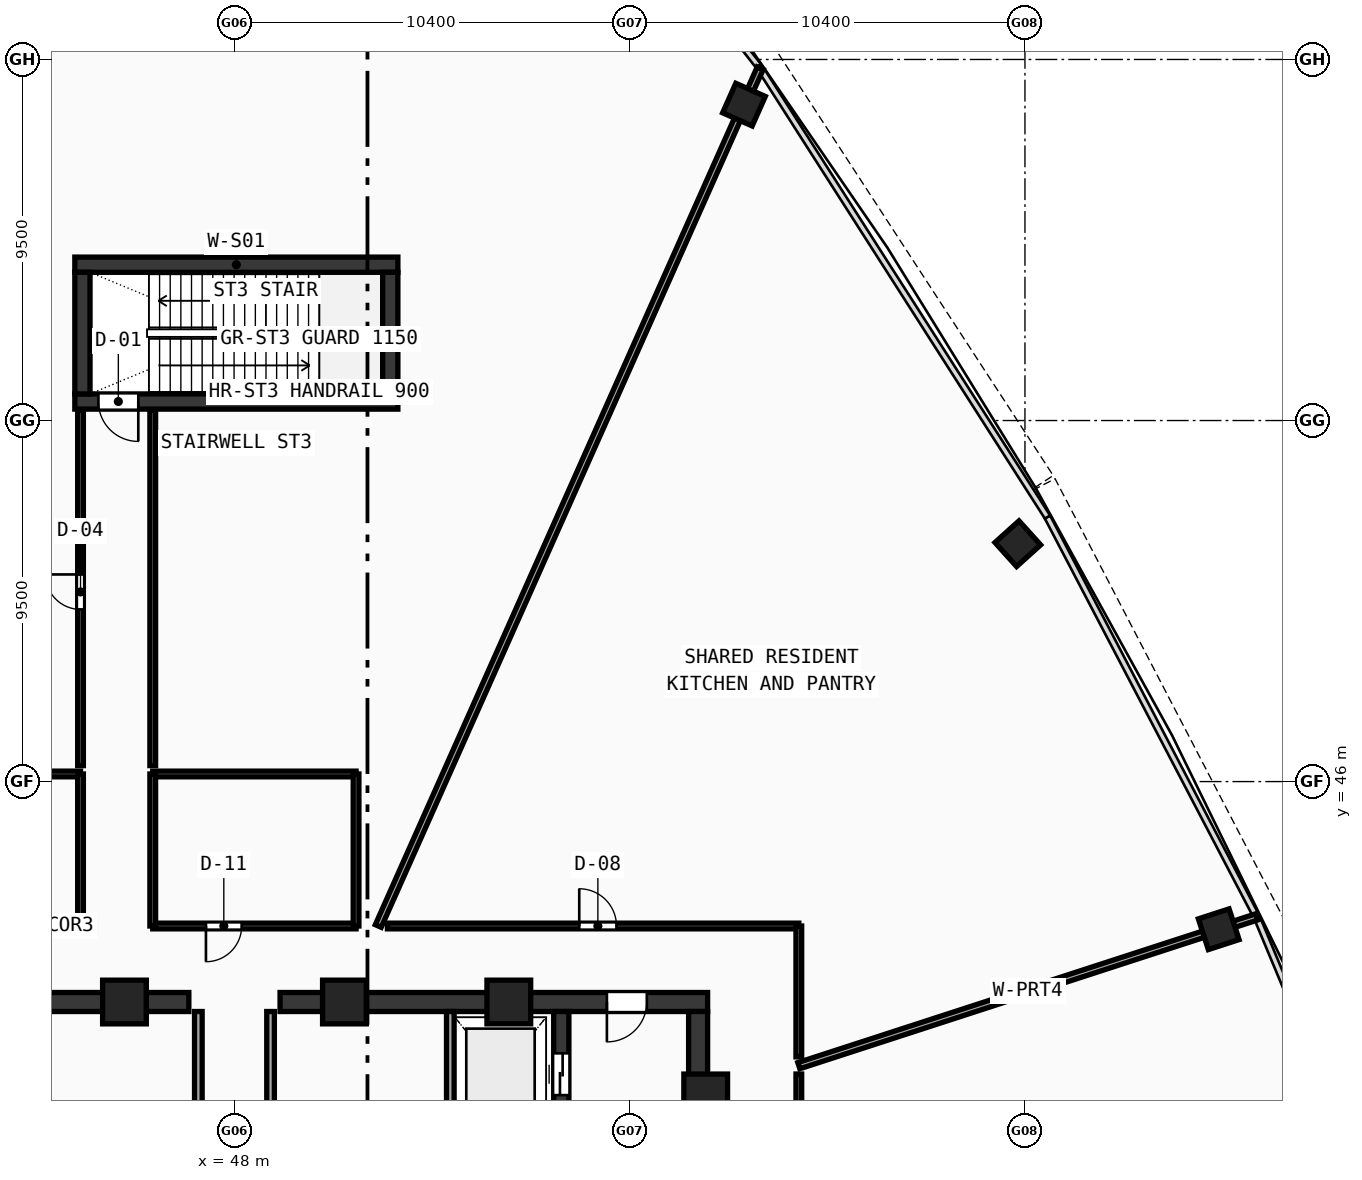
"""IFC4 building model, lengths in metres.
Left out: names, types, materials, properties, quantities, classifications, styles, units other than length and angle.
Written with IfcOpenShell. Run it as: python <this file> out.ifc"""

import sys

from ifc_helpers import new_model, si_unit, direction, frame, frame_2d, origin, origin_with_axes, origin_2d, place, context, subcontext, project, spatial, rectangle, hollow_rectangle, extrude, source, transform, mapped, element, fill, save


model = new_model("IFC4")
c1 = context("Model", 3, precision=1e-05, world=origin(), true_north=direction((0.0, 1.0)))
c2 = subcontext(c1, "Body", "Model", "MODEL_VIEW")
j1 = project(units=[si_unit("LENGTHUNIT", "METRE"), si_unit("PLANEANGLEUNIT", "RADIAN")], contexts=[c1])
p1 = place(None, origin())
s1 = spatial("IfcSite", under=j1, at=p1, CompositionType="ELEMENT")
p2 = place(p1, origin())
s2 = spatial("IfcBuilding", under=s1, at=p2, CompositionType="ELEMENT")
p3 = place(p2, frame((0.0, 0.0, 266.91)))
s3 = spatial("IfcBuildingStorey", under=s2, at=p3, CompositionType="ELEMENT", Elevation=266.91)
p4 = place(p3, frame((35.55, 40.2, 0.0), z_axis=(0.0, 0.0, 1.0), x_axis=(1.0, 0.0, 0.0)))
e1 = element("IfcWall", 1, at=p4, inside=s3, PredefinedType="SHEAR", context=c2, shape_type="SweptSolid", body=[
    extrude(rectangle(XDim=11.25, YDim=0.5, at=frame_2d((5.625, 0.0))), origin(), (0.0, 0.0, 1.0), 5.57),
])
p5 = place(p4, frame((1.6, 0.0, 0.0)))
e2 = element("IfcOpeningElement", 2, at=p5, cuts=e1, PredefinedType="OPENING", context=c2, shape_type="SweptSolid", body=[
    extrude(rectangle(XDim=1.05, YDim=2.1, at=frame_2d((0.525, 1.05))), frame((0.0, 0.26, 0.0), z_axis=(0.0, -1.0, 0.0), x_axis=(1.0, 0.0, 0.0)), (0.0, 0.0, 1.0), 0.52),
])
p6 = place(p3, frame((49.2, 40.2, 0.0), z_axis=(0.0, 0.0, 1.0), x_axis=(1.0, 0.0, 0.0)))
e3 = element("IfcWall", 3, at=p6, inside=s3, PredefinedType="SHEAR", context=c2, shape_type="SweptSolid", body=[
    extrude(rectangle(XDim=11.25, YDim=0.5, at=frame_2d((5.625, 0.0))), origin(), (0.0, 0.0, 1.0), 5.57),
])
p7 = place(p6, frame((8.6, 0.0, 0.0)))
e4 = element("IfcOpeningElement", 4, at=p7, cuts=e3, PredefinedType="OPENING", context=c2, shape_type="SweptSolid", body=[
    extrude(rectangle(XDim=1.05, YDim=2.1, at=frame_2d((0.525, 1.05))), frame((0.0, 0.26, 0.0), z_axis=(0.0, -1.0, 0.0), x_axis=(1.0, 0.0, 0.0)), (0.0, 0.0, 1.0), 0.52),
])
p8 = place(p3, frame((60.2, 27.75, 0.0), z_axis=(0.0, 0.0, 1.0), x_axis=(0.0, 1.0, 0.0)))
e5 = element("IfcWall", 5, at=p8, inside=s3, PredefinedType="SHEAR", context=c2, shape_type="SweptSolid", body=[
    extrude(rectangle(XDim=12.2, YDim=0.5, at=frame_2d((6.1, 0.0))), origin(), (0.0, 0.0, 1.0), 5.57),
])
p9 = place(p3, frame((56.6, 27.75, 0.0), z_axis=(0.0, 0.0, 1.0), x_axis=(0.0, 1.0, 0.0)))
e6 = element("IfcWall", 6, at=p9, inside=s3, PredefinedType="SHEAR", context=c2, shape_type="SweptSolid", body=[
    extrude(rectangle(XDim=12.2, YDim=0.4, at=frame_2d((6.1, 0.0))), origin(), (0.0, 0.0, 1.0), 5.57),
])
p10 = place(p9, frame((10.0, 0.0, 0.0)))
e7 = element("IfcOpeningElement", 7, at=p10, cuts=e6, PredefinedType="OPENING", context=c2, shape_type="SweptSolid", body=[
    extrude(rectangle(XDim=1.1, YDim=2.1, at=frame_2d((0.55, 1.05))), frame((0.0, 0.21, 0.0), z_axis=(0.0, -1.0, 0.0), x_axis=(1.0, 0.0, 0.0)), (0.0, 0.0, 1.0), 0.42),
])
p11 = place(p3, frame((43.8, 59.6, 0.0), z_axis=(0.0, 0.0, 1.0), x_axis=(1.0, 0.0, 0.0)))
e8 = element("IfcWall", 8, at=p11, inside=s3, PredefinedType="SHEAR", context=c2, shape_type="SweptSolid", body=[
    extrude(rectangle(XDim=8.5, YDim=0.4, at=frame_2d((4.25, 0.0))), origin(), (0.0, 0.0, 1.0), 5.57),
])
p12 = place(p3, frame((43.8, 56.0, 0.0), z_axis=(0.0, 0.0, 1.0), x_axis=(1.0, 0.0, 0.0)))
e9 = element("IfcWall", 9, at=p12, inside=s3, PredefinedType="SHEAR", context=c2, shape_type="SweptSolid", body=[
    extrude(rectangle(XDim=8.5, YDim=0.4, at=frame_2d((4.25, 0.0))), origin(), (0.0, 0.0, 1.0), 5.57),
])
p13 = place(p12, frame((0.62, 0.0, 0.0)))
e10 = element("IfcOpeningElement", 10, at=p13, cuts=e9, PredefinedType="OPENING", context=c2, shape_type="SweptSolid", body=[
    extrude(rectangle(XDim=1.05, YDim=2.1, at=frame_2d((0.525, 1.05))), frame((0.0, 0.21, 0.0), z_axis=(0.0, -1.0, 0.0), x_axis=(1.0, 0.0, 0.0)), (0.0, 0.0, 1.0), 0.42),
])
for number, where, z_axis, x_axis in (
    (11, (44.0, 56.2, 0.0), (0.0, 0.0, 1.0), (0.0, 1.0, 0.0)),
    (12, (52.1, 56.2, 0.0), (0.0, 0.0, 1.0), (0.0, 1.0, 0.0)),
):
    element("IfcWall", number, at=place(p3, frame(where, z_axis=z_axis, x_axis=x_axis)), inside=s3, PredefinedType="SHEAR", context=c2, shape_type="SweptSolid", body=[
        extrude(rectangle(XDim=3.2, YDim=0.4, at=frame_2d((1.6, 0.0))), origin(), (0.0, 0.0, 1.0), 5.57),
    ])
m1 = source(origin(), c2, "Body", "SweptSolid", [
    extrude(hollow_rectangle(XDim=1.15, YDim=1.15, WallThickness=0.048, at=origin_2d()), origin(), (0.0, 0.0, 1.0), 5.83),
])
for number, where, z_axis, x_axis in (
    (13, (60.4, 37.729, -0.26), (0.0, 0.0, 1.0), (1.0, 0.0, 0.0)),
    (14, (55.219, 40.2, -0.26), (0.0, 0.0, 1.0), (1.0, 0.0, 0.0)),
    (15, (50.894, 40.2, -0.26), (0.0, 0.0, 1.0), (1.0, 0.0, 0.0)),
    (16, (45.106, 40.2, -0.26), (0.0, 0.0, 1.0), (1.0, 0.0, 0.0)),
):
    element("IfcColumn", number, at=place(p3, frame(where, z_axis=z_axis, x_axis=x_axis)), inside=s3, PredefinedType="COLUMN", context=c2, shape_type="MappedRepresentation", body=[
        mapped(m1, transform((0.0, 0.0, 0.0), scale=1.0)),
    ])
m2 = source(origin(), c2, "Body", "SweptSolid", [
    extrude(hollow_rectangle(XDim=0.85, YDim=0.85, WallThickness=0.034, at=origin_2d()), origin(), (0.0, 0.0, 1.0), 5.83),
])
for number, where, z_axis, x_axis in (
    (17, (73.899, 42.115, -0.26), (0.0, 0.0, 1.0), (-0.309, 0.951, 0.0)),
    (18, (68.612, 52.259, -0.26), (0.0, 0.0, 1.0), (-0.669, 0.743, 0.0)),
    (19, (61.407, 63.812, -0.26), (0.0, 0.0, 1.0), (-0.914, 0.407, 0.0)),
):
    element("IfcColumn", number, at=place(p3, frame(where, z_axis=z_axis, x_axis=x_axis)), inside=s3, PredefinedType="COLUMN", context=c2, shape_type="MappedRepresentation", body=[
        mapped(m2, transform((0.0, 0.0, 0.0), scale=1.0)),
    ])
p14 = place(p3, frame((53.68, 36.65, 0.0), z_axis=(0.0, 0.0, 1.0), x_axis=(0.0, 1.0, 0.0)))
e20 = element("IfcWall", 20, at=p14, inside=s3, PredefinedType="SOLIDWALL", context=c2, shape_type="SweptSolid", body=[
    extrude(rectangle(XDim=3.3, YDim=0.2, at=frame_2d((1.65, 0.0))), origin(), (0.0, 0.0, 1.0), 5.57),
])
p15 = place(p3, frame((47.05, 37.32, 0.0), z_axis=(0.0, 0.0, 1.0), x_axis=(0.0, 1.0, 0.0)))
e21 = element("IfcWall", 21, at=p15, inside=s3, PredefinedType="SOLIDWALL", context=c2, shape_type="SweptSolid", body=[
    extrude(rectangle(XDim=2.63, YDim=0.2, at=frame_2d((1.315, 0.0))), origin(), (0.0, 0.0, 1.0), 5.57),
])
p16 = place(p3, frame((48.95, 35.85, 0.0), z_axis=(0.0, 0.0, 1.0), x_axis=(0.0, 1.0, 0.0)))
e22 = element("IfcWall", 22, at=p16, inside=s3, PredefinedType="SOLIDWALL", context=c2, shape_type="SweptSolid", body=[
    extrude(rectangle(XDim=4.1, YDim=0.2, at=frame_2d((2.05, 0.0))), origin(), (0.0, 0.0, 1.0), 5.57),
])
p17 = place(p3, frame((39.6, 42.2, 0.0), z_axis=(0.0, 0.0, 1.0), x_axis=(1.0, 0.0, 0.0)))
e23 = element("IfcWall", 23, at=p17, inside=s3, PredefinedType="PARTITIONING", context=c2, shape_type="SweptSolid", body=[
    extrude(rectangle(XDim=4.35, YDim=0.15, at=frame_2d((2.175, 0.0))), origin(), (0.0, 0.0, 1.0), 2.22),
])
p18 = place(p17, frame((1.4, 0.0, 0.0)))
e24 = element("IfcOpeningElement", 24, at=p18, cuts=e23, PredefinedType="OPENING", context=c2, shape_type="SweptSolid", body=[
    extrude(rectangle(XDim=0.92, YDim=2.1, at=frame_2d((0.46, 1.05))), frame((0.0, 0.085, 0.0), z_axis=(0.0, -1.0, 0.0), x_axis=(1.0, 0.0, 0.0)), (0.0, 0.0, 1.0), 0.17),
])
p19 = place(p3, frame((39.6, 46.2, 0.0), z_axis=(0.0, 0.0, 1.0), x_axis=(1.0, 0.0, 0.0)))
e25 = element("IfcWall", 25, at=p19, inside=s3, PredefinedType="PARTITIONING", context=c2, shape_type="SweptSolid", body=[
    extrude(rectangle(XDim=4.35, YDim=0.15, at=frame_2d((2.175, 0.0))), origin(), (0.0, 0.0, 1.0), 2.22),
])
p20 = place(p3, frame((43.95, 42.2, 0.0), z_axis=(0.0, 0.0, 1.0), x_axis=(0.0, 1.0, 0.0)))
e26 = element("IfcWall", 26, at=p20, inside=s3, PredefinedType="PARTITIONING", context=c2, shape_type="SweptSolid", body=[
    extrude(rectangle(XDim=4.0, YDim=0.15, at=frame_2d((2.0, 0.0))), origin(), (0.0, 0.0, 1.0), 2.22),
])
p21 = place(p3, frame((45.85, 42.2, 0.0), z_axis=(0.0, 0.0, 1.0), x_axis=(1.0, 0.0, 0.0)))
e27 = element("IfcWall", 27, at=p21, inside=s3, PredefinedType="PARTITIONING", context=c2, shape_type="SweptSolid", body=[
    extrude(rectangle(XDim=5.35, YDim=0.15, at=frame_2d((2.675, 0.0))), origin(), (0.0, 0.0, 1.0), 5.57),
])
p22 = place(p21, frame((1.4, 0.0, 0.0)))
e28 = element("IfcOpeningElement", 28, at=p22, cuts=e27, PredefinedType="OPENING", context=c2, shape_type="SweptSolid", body=[
    extrude(rectangle(XDim=0.94, YDim=2.1, at=frame_2d((0.47, 1.05))), frame((0.0, 0.085, 0.0), z_axis=(0.0, -1.0, 0.0), x_axis=(1.0, 0.0, 0.0)), (0.0, 0.0, 1.0), 0.17),
])
p23 = place(p3, frame((45.85, 46.2, 0.0), z_axis=(0.0, 0.0, 1.0), x_axis=(1.0, 0.0, 0.0)))
e29 = element("IfcWall", 29, at=p23, inside=s3, PredefinedType="PARTITIONING", context=c2, shape_type="SweptSolid", body=[
    extrude(rectangle(XDim=5.35, YDim=0.15, at=frame_2d((2.675, 0.0))), origin(), (0.0, 0.0, 1.0), 5.57),
])
for number, where, z_axis, x_axis in (
    (30, (45.85, 42.2, 0.0), (0.0, 0.0, 1.0), (0.0, 1.0, 0.0)),
    (31, (51.2, 42.2, 0.0), (0.0, 0.0, 1.0), (0.0, 1.0, 0.0)),
):
    element("IfcWall", number, at=place(p3, frame(where, z_axis=z_axis, x_axis=x_axis)), inside=s3, PredefinedType="PARTITIONING", context=c2, shape_type="SweptSolid", body=[
        extrude(rectangle(XDim=4.0, YDim=0.15, at=frame_2d((2.0, 0.0))), origin(), (0.0, 0.0, 1.0), 5.57),
    ])
p24 = place(p3, frame((62.85, 38.525, 0.0), z_axis=(0.0, 0.0, 1.0), x_axis=(0.951057436246, 0.309014163043, 0.0)))
e32 = element("IfcWall", 32, at=p24, inside=s3, PredefinedType="PARTITIONING", context=c2, shape_type="SweptSolid", body=[
    extrude(rectangle(XDim=12.667, YDim=0.17, at=frame_2d((6.333, 0.0))), origin(), (0.0, 0.0, 1.0), 2.22),
])
p25 = place(p3, frame((51.784, 42.2, 0.0), z_axis=(0.0, 0.0, 1.0), x_axis=(0.406737985753, 0.913544859843, 0.0)))
e33 = element("IfcWall", 33, at=p25, inside=s3, PredefinedType="PARTITIONING", context=c2, shape_type="SweptSolid", body=[
    extrude(rectangle(XDim=24.707, YDim=0.17, at=frame_2d((12.354, 0.0))), origin(), (0.0, 0.0, 1.0), 2.22),
])
p26 = place(p3, frame((43.95, 46.42, 0.0), z_axis=(0.0, 0.0, 1.0), x_axis=(0.0, 1.0, 0.0)))
e34 = element("IfcWall", 34, at=p26, inside=s3, PredefinedType="PARTITIONING", context=c2, shape_type="SweptSolid", body=[
    extrude(rectangle(XDim=9.36, YDim=0.15, at=frame_2d((4.68, 0.0))), origin(), (0.0, 0.0, 1.0), 5.22),
])
p27 = place(p26, frame((4.11, 0.0, 0.0)))
e35 = element("IfcOpeningElement", 35, at=p27, cuts=e34, PredefinedType="OPENING", context=c2, shape_type="SweptSolid", body=[
    extrude(rectangle(XDim=0.92, YDim=2.1, at=frame_2d((0.46, 1.05))), frame((0.0, 0.085, 0.0), z_axis=(0.0, -1.0, 0.0), x_axis=(1.0, 0.0, 0.0)), (0.0, 0.0, 1.0), 0.17),
])
p28 = place(p3, frame((45.85, 55.78, 0.0), z_axis=(0.0, 0.0, 1.0), x_axis=(0.0, -1.0, 0.0)))
e36 = element("IfcWall", 36, at=p28, inside=s3, PredefinedType="PARTITIONING", context=c2, shape_type="SweptSolid", body=[
    extrude(rectangle(XDim=9.36, YDim=0.15, at=frame_2d((4.68, 0.0))), origin(), (0.0, 0.0, 1.0), 5.22),
])
p29 = place(p3, frame((52.025, 42.2, 0.0), z_axis=(0.0, 0.0, 1.0), x_axis=(1.0, 0.0, 0.0)))
e37 = element("IfcWall", 37, at=p29, inside=s3, PredefinedType="PARTITIONING", context=c2, shape_type="SweptSolid", body=[
    extrude(rectangle(XDim=10.825, YDim=0.15, at=frame_2d((5.413, 0.0))), origin(), (0.0, 0.0, 1.0), 2.22),
])
p30 = place(p29, frame((5.047, 0.0, 0.0)))
e38 = element("IfcOpeningElement", 38, at=p30, cuts=e37, PredefinedType="OPENING", context=c2, shape_type="SweptSolid", body=[
    extrude(rectangle(XDim=0.98, YDim=2.12, at=frame_2d((0.49, 1.06))), frame((0.0, 0.085, 0.0), z_axis=(0.0, -1.0, 0.0), x_axis=(1.0, 0.0, 0.0)), (0.0, 0.0, 1.0), 0.17),
])
p31 = place(p3, frame((62.85, 42.2, 0.0), z_axis=(0.0, 0.0, 1.0), x_axis=(0.0, -1.0, 0.0)))
e39 = element("IfcWall", 39, at=p31, inside=s3, PredefinedType="PARTITIONING", context=c2, shape_type="SweptSolid", body=[
    extrude(rectangle(XDim=3.444, YDim=0.15, at=frame_2d((1.722, 0.0))), origin(), (0.0, 0.0, 1.0), 2.22),
])
p32 = place(p3, frame((62.85, 38.305, 0.0), z_axis=(0.0, 0.0, 1.0), x_axis=(0.0, -1.0, 0.0)))
e40 = element("IfcWall", 40, at=p32, inside=s3, PredefinedType="PARTITIONING", context=c2, shape_type="SweptSolid", body=[
    extrude(rectangle(XDim=7.004, YDim=0.15, at=frame_2d((3.502, 0.0))), origin(), (0.0, 0.0, 1.0), 2.22),
])
p33 = place(p32, frame((3.042, 0.0, 0.0)))
e41 = element("IfcOpeningElement", 41, at=p33, cuts=e40, PredefinedType="OPENING", context=c2, shape_type="SweptSolid", body=[
    extrude(rectangle(XDim=0.92, YDim=2.1, at=frame_2d((0.46, 1.05))), frame((0.0, 0.085, 0.0), z_axis=(0.0, -1.0, 0.0), x_axis=(1.0, 0.0, 0.0)), (0.0, 0.0, 1.0), 0.17),
])
m3 = source(origin(), c2, "Body", "SweptSolid", [
    extrude(rectangle(XDim=1.05, YDim=2.1, at=frame_2d((0.525, 1.05))), frame((0.0, 0.025, 0.0), z_axis=(0.0, -1.0, 0.0), x_axis=(1.0, 0.0, 0.0)), (0.0, 0.0, 1.0), 0.05),
])
p34 = place(p7, frame((1.05, 0.0, 0.0), z_axis=(0.0, 0.0, 1.0), x_axis=(-1.0, 0.0, 0.0)))
e42 = element("IfcDoor", 42, at=p34, inside=s3, OperationType="SINGLE_SWING_RIGHT", PredefinedType="DOOR", context=c2, shape_type="MappedRepresentation", body=[
    mapped(m3, transform((0.0, 0.0, 0.0), scale=1.0)),
])
fill(e4, e42)
m4 = source(origin(), c2, "Body", "SweptSolid", [
    extrude(rectangle(XDim=1.1, YDim=2.1, at=frame_2d((0.55, 1.05))), frame((0.0, 0.025, 0.0), z_axis=(0.0, -1.0, 0.0), x_axis=(1.0, 0.0, 0.0)), (0.0, 0.0, 1.0), 0.05),
])
p35 = place(p10, origin_with_axes())
e43 = element("IfcDoor", 43, at=p35, inside=s3, OperationType="DOUBLE_DOOR_SLIDING", PredefinedType="DOOR", context=c2, shape_type="MappedRepresentation", body=[
    mapped(m4, transform((0.0, 0.0, 0.0), scale=1.0)),
])
fill(e7, e43)
p36 = place(p13, frame((1.05, 0.0, 0.0), z_axis=(0.0, 0.0, 1.0), x_axis=(-1.0, 0.0, 0.0)))
e44 = element("IfcDoor", 44, at=p36, inside=s3, OperationType="SINGLE_SWING_LEFT", PredefinedType="DOOR", context=c2, shape_type="MappedRepresentation", body=[
    mapped(m3, transform((0.0, 0.0, 0.0), scale=1.0)),
])
fill(e10, e44)
m5 = source(origin(), c2, "Body", "SweptSolid", [
    extrude(rectangle(XDim=0.94, YDim=2.1, at=frame_2d((0.47, 1.05))), frame((0.0, 0.025, 0.0), z_axis=(0.0, -1.0, 0.0), x_axis=(1.0, 0.0, 0.0)), (0.0, 0.0, 1.0), 0.05),
])
p37 = place(p22, frame((0.94, 0.0, 0.0), z_axis=(0.0, 0.0, 1.0), x_axis=(-1.0, 0.0, 0.0)))
e45 = element("IfcDoor", 45, at=p37, inside=s3, OperationType="SINGLE_SWING_RIGHT", PredefinedType="DOOR", context=c2, shape_type="MappedRepresentation", body=[
    mapped(m5, transform((0.0, 0.0, 0.0), scale=1.0)),
])
fill(e28, e45)
m6 = source(origin(), c2, "Body", "SweptSolid", [
    extrude(rectangle(XDim=0.98, YDim=2.12, at=frame_2d((0.49, 1.06))), frame((0.0, 0.025, 0.0), z_axis=(0.0, -1.0, 0.0), x_axis=(1.0, 0.0, 0.0)), (0.0, 0.0, 1.0), 0.05),
])
p38 = place(p30, origin_with_axes())
e46 = element("IfcDoor", 46, at=p38, inside=s3, OperationType="SINGLE_SWING_LEFT", PredefinedType="DOOR", context=c2, shape_type="MappedRepresentation", body=[
    mapped(m6, transform((0.0, 0.0, 0.0), scale=1.0)),
])
fill(e38, e46)
m7 = source(origin(), c2, "Body", "SweptSolid", [
    extrude(rectangle(XDim=0.92, YDim=2.1, at=frame_2d((0.46, 1.05))), frame((0.0, 0.025, 0.0), z_axis=(0.0, -1.0, 0.0), x_axis=(1.0, 0.0, 0.0)), (0.0, 0.0, 1.0), 0.05),
])
p39 = place(p27, origin_with_axes())
e47 = element("IfcDoor", 47, at=p39, inside=s3, OperationType="SINGLE_SWING_RIGHT", PredefinedType="DOOR", context=c2, shape_type="MappedRepresentation", body=[
    mapped(m7, transform((0.0, 0.0, 0.0), scale=1.0)),
])
fill(e35, e47)
save(model, sys.argv[1])
